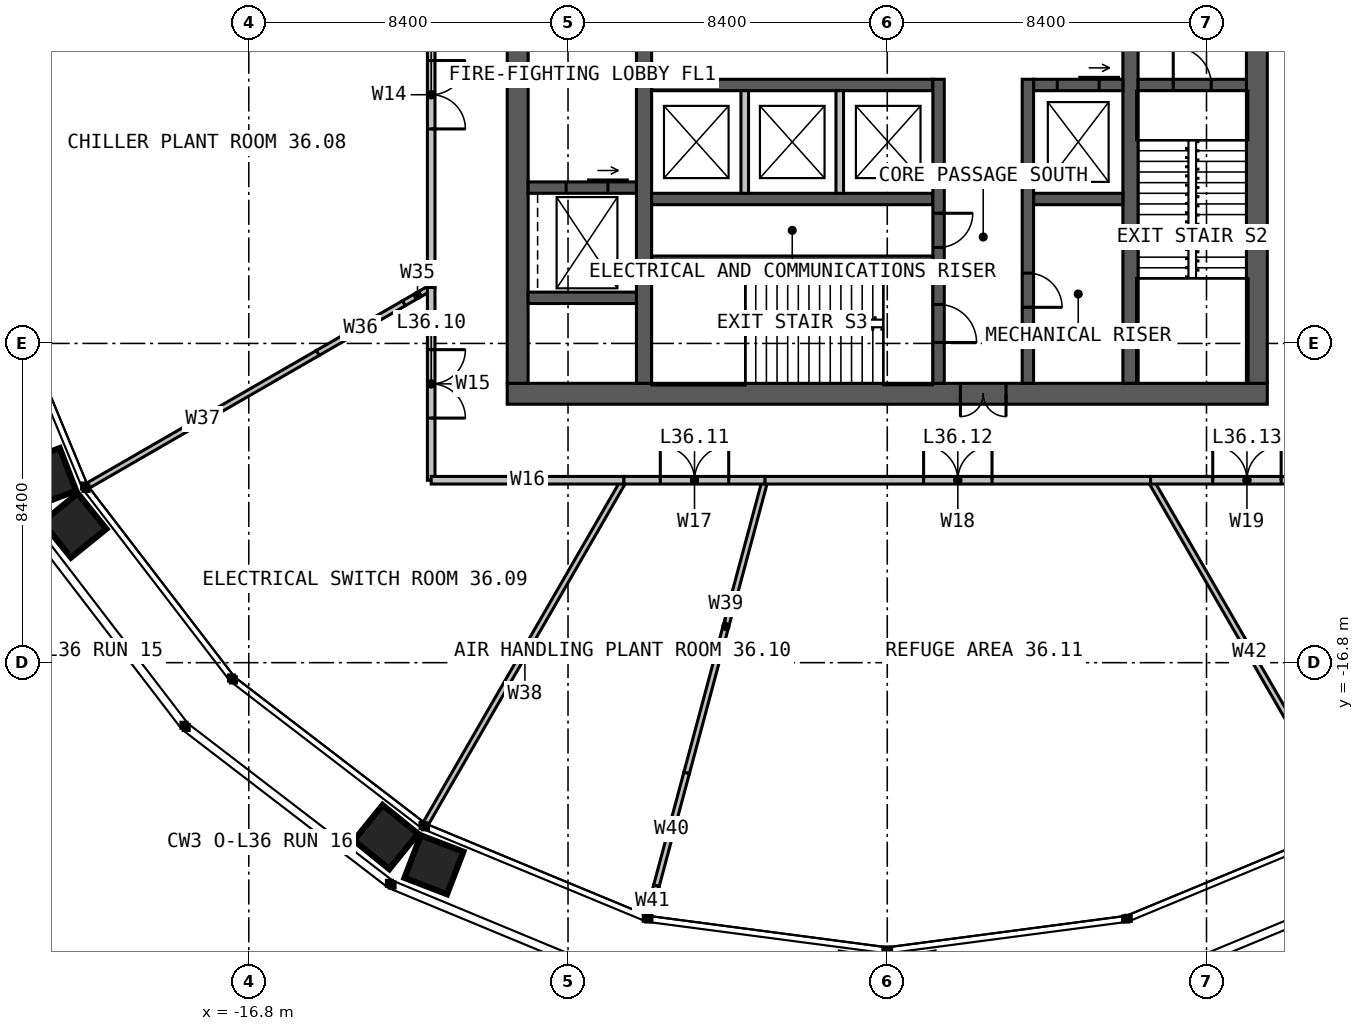
"""IFC4 building model, lengths in metres.
Left out: names, types, materials, properties, quantities, classifications, styles, units other than length and angle.
Written with IfcOpenShell. Run it as: python <this file> out.ifc"""

import sys

from ifc_helpers import new_model, si_unit, direction, frame, frame_2d, origin, place, context, subcontext, project, spatial, rectangle, extrude, element, fill, save


model = new_model("IFC4")
c1 = context("Model", 3, precision=1e-05, world=origin(), true_north=direction((0.0, 1.0)))
c2 = subcontext(c1, "Body", "Model", "MODEL_VIEW")
j1 = project(units=[si_unit("LENGTHUNIT", "METRE"), si_unit("PLANEANGLEUNIT", "RADIAN")], contexts=[c1])
p1 = place(None, origin())
s1 = spatial("IfcSite", under=j1, at=p1, CompositionType="ELEMENT")
p2 = place(p1, origin())
s2 = spatial("IfcBuilding", under=s1, at=p2, CompositionType="ELEMENT")
p3 = place(p2, frame((0.0, 0.0, 150.0)))
s3 = spatial("IfcBuildingStorey", under=s2, at=p3, CompositionType="ELEMENT", Elevation=150.0)
p4 = place(p3, frame((10.0, -9.725, 0.0), z_axis=(0.0, 0.0, 1.0), x_axis=(-1.0, 0.0, 0.0)))
e1 = element("IfcWall", 1, at=p4, inside=s3, PredefinedType="SOLIDWALL", context=c2, shape_type="SweptSolid", body=[
    extrude(rectangle(XDim=20.0, YDim=0.55, at=frame_2d((10.0, 0.0))), origin(), (0.0, 0.0, 1.0), 5.0),
])
p5 = place(p4, frame((6.875, 0.0, 0.0)))
e2 = element("IfcOpeningElement", 2, at=p5, cuts=e1, PredefinedType="OPENING", context=c2, shape_type="SweptSolid", body=[
    extrude(rectangle(XDim=1.2, YDim=2.2, at=frame_2d((0.6, 1.1))), frame((0.0, 0.285, 0.0), z_axis=(0.0, -1.0, 0.0), x_axis=(1.0, 0.0, 0.0)), (0.0, 0.0, 1.0), 0.57),
])
for number, where, z_axis, x_axis in (
    (3, (9.725, -9.45, 0.0), (0.0, 0.0, 1.0), (0.0, 1.0, 0.0)),
    (4, (-9.725, 9.45, 0.0), (0.0, 0.0, 1.0), (0.0, -1.0, 0.0)),
):
    element("IfcWall", number, at=place(p3, frame(where, z_axis=z_axis, x_axis=x_axis)), inside=s3, PredefinedType="SOLIDWALL", context=c2, shape_type="SweptSolid", body=[
        extrude(rectangle(XDim=18.9, YDim=0.55, at=frame_2d((9.45, 0.0))), origin(), (0.0, 0.0, 1.0), 5.0),
    ])
p6 = place(p3, frame((-6.4, -9.45, 0.0), z_axis=(0.0, 0.0, 1.0), x_axis=(0.0, 1.0, 0.0)))
e5 = element("IfcWall", 5, at=p6, inside=s3, PredefinedType="SOLIDWALL", context=c2, shape_type="SweptSolid", body=[
    extrude(rectangle(XDim=18.9, YDim=0.4, at=frame_2d((9.45, 0.0))), origin(), (0.0, 0.0, 1.0), 5.0),
])
p7 = place(p6, frame((8.95, 0.0, 0.0)))
e6 = element("IfcOpeningElement", 6, at=p7, cuts=e5, PredefinedType="OPENING", context=c2, shape_type="SweptSolid", body=[
    extrude(rectangle(XDim=1.0, YDim=2.2, at=frame_2d((0.5, 1.1))), frame((0.0, 0.21, 0.0), z_axis=(0.0, -1.0, 0.0), x_axis=(1.0, 0.0, 0.0)), (0.0, 0.0, 1.0), 0.42),
])
p8 = place(p3, frame((6.4, 9.45, 0.0), z_axis=(0.0, 0.0, 1.0), x_axis=(0.0, -1.0, 0.0)))
e7 = element("IfcWall", 7, at=p8, inside=s3, PredefinedType="SOLIDWALL", context=c2, shape_type="SweptSolid", body=[
    extrude(rectangle(XDim=18.9, YDim=0.4, at=frame_2d((9.45, 0.0))), origin(), (0.0, 0.0, 1.0), 5.0),
])
p9 = place(p8, frame((8.95, 0.0, 0.0)))
e8 = element("IfcOpeningElement", 8, at=p9, cuts=e7, PredefinedType="OPENING", context=c2, shape_type="SweptSolid", body=[
    extrude(rectangle(XDim=1.0, YDim=2.2, at=frame_2d((0.5, 1.1))), frame((0.0, 0.21, 0.0), z_axis=(0.0, -1.0, 0.0), x_axis=(1.0, 0.0, 0.0)), (0.0, 0.0, 1.0), 0.42),
])
p10 = place(p3, frame((-6.2, -1.6, 0.0), z_axis=(0.0, 0.0, 1.0), x_axis=(1.0, 0.0, 0.0)))
e9 = element("IfcWall", 9, at=p10, inside=s3, PredefinedType="SOLIDWALL", context=c2, shape_type="SweptSolid", body=[
    extrude(rectangle(XDim=7.4, YDim=0.3, at=frame_2d((3.7, 0.0))), origin(), (0.0, 0.0, 1.0), 5.0),
])
p11 = place(p3, frame((3.85, -1.6, 0.0), z_axis=(0.0, 0.0, 1.0), x_axis=(1.0, 0.0, 0.0)))
e10 = element("IfcWall", 10, at=p11, inside=s3, PredefinedType="SOLIDWALL", context=c2, shape_type="SweptSolid", body=[
    extrude(rectangle(XDim=2.35, YDim=0.3, at=frame_2d((1.175, 0.0))), origin(), (0.0, 0.0, 1.0), 5.0),
])
p12 = place(p11, frame((0.625, 0.0, 0.0)))
e11 = element("IfcOpeningElement", 11, at=p12, cuts=e10, PredefinedType="OPENING", context=c2, shape_type="SweptSolid", body=[
    extrude(rectangle(XDim=1.1, YDim=2.2, at=frame_2d((0.55, 1.1))), frame((0.0, 0.16, 0.0), z_axis=(0.0, -1.0, 0.0), x_axis=(1.0, 0.0, 0.0)), (0.0, 0.0, 1.0), 0.32),
])
p13 = place(p3, frame((-6.2, -4.6, 0.0), z_axis=(0.0, 0.0, 1.0), x_axis=(1.0, 0.0, 0.0)))
e12 = element("IfcWall", 12, at=p13, inside=s3, PredefinedType="SOLIDWALL", context=c2, shape_type="SweptSolid", body=[
    extrude(rectangle(XDim=7.4, YDim=0.3, at=frame_2d((3.7, 0.0))), origin(), (0.0, 0.0, 1.0), 5.0),
])
p14 = place(p3, frame((3.85, -4.6, 0.0), z_axis=(0.0, 0.0, 1.0), x_axis=(1.0, 0.0, 0.0)))
e13 = element("IfcWall", 13, at=p14, inside=s3, PredefinedType="SOLIDWALL", context=c2, shape_type="SweptSolid", body=[
    extrude(rectangle(XDim=2.35, YDim=0.3, at=frame_2d((1.175, 0.0))), origin(), (0.0, 0.0, 1.0), 5.0),
])
p15 = place(p3, frame((1.35, -1.45, 0.0), z_axis=(0.0, 0.0, 1.0), x_axis=(0.0, -1.0, 0.0)))
e14 = element("IfcWall", 14, at=p15, inside=s3, PredefinedType="SOLIDWALL", context=c2, shape_type="SweptSolid", body=[
    extrude(rectangle(XDim=8.0, YDim=0.3, at=frame_2d((4.0, 0.0))), origin(), (0.0, 0.0, 1.0), 5.0),
])
p16 = place(p15, frame((5.925, 0.0, 0.0)))
e15 = element("IfcOpeningElement", 15, at=p16, cuts=e14, PredefinedType="OPENING", context=c2, shape_type="SweptSolid", body=[
    extrude(rectangle(XDim=1.0, YDim=2.2, at=frame_2d((0.5, 1.1))), frame((0.0, 0.16, 0.0), z_axis=(0.0, -1.0, 0.0), x_axis=(1.0, 0.0, 0.0)), (0.0, 0.0, 1.0), 0.32),
])
p17 = place(p15, frame((3.525, 0.0, 0.0)))
e16 = element("IfcOpeningElement", 16, at=p17, cuts=e14, PredefinedType="OPENING", context=c2, shape_type="SweptSolid", body=[
    extrude(rectangle(XDim=0.9, YDim=2.2, at=frame_2d((0.45, 1.1))), frame((0.0, 0.16, 0.0), z_axis=(0.0, -1.0, 0.0), x_axis=(1.0, 0.0, 0.0)), (0.0, 0.0, 1.0), 0.32),
])
p18 = place(p3, frame((3.7, -1.45, 0.0), z_axis=(0.0, 0.0, 1.0), x_axis=(0.0, -1.0, 0.0)))
e17 = element("IfcWall", 17, at=p18, inside=s3, PredefinedType="SOLIDWALL", context=c2, shape_type="SweptSolid", body=[
    extrude(rectangle(XDim=8.0, YDim=0.3, at=frame_2d((4.0, 0.0))), origin(), (0.0, 0.0, 1.0), 5.0),
])
p19 = place(p18, frame((5.1, 0.0, 0.0)))
e18 = element("IfcOpeningElement", 18, at=p19, cuts=e17, PredefinedType="OPENING", context=c2, shape_type="SweptSolid", body=[
    extrude(rectangle(XDim=0.9, YDim=2.2, at=frame_2d((0.45, 1.1))), frame((0.0, 0.16, 0.0), z_axis=(0.0, -1.0, 0.0), x_axis=(1.0, 0.0, 0.0)), (0.0, 0.0, 1.0), 0.32),
])
p20 = place(p3, frame((-6.2, -6.2, 0.0), z_axis=(0.0, 0.0, 1.0), x_axis=(1.0, 0.0, 0.0)))
e19 = element("IfcWall", 19, at=p20, inside=s3, PredefinedType="SOLIDWALL", context=c2, shape_type="SweptSolid", body=[
    extrude(rectangle(XDim=7.4, YDim=0.2, at=frame_2d((3.7, 0.0))), origin(), (0.0, 0.0, 1.0), 5.0),
])
p21 = place(p3, frame((6.6, -1.6, 0.0), z_axis=(0.0, 0.0, 1.0), x_axis=(1.0, 0.0, 0.0)))
e20 = element("IfcWall", 20, at=p21, inside=s3, PredefinedType="SOLIDWALL", context=c2, shape_type="SweptSolid", body=[
    extrude(rectangle(XDim=2.85, YDim=0.3, at=frame_2d((1.425, 0.0))), origin(), (0.0, 0.0, 1.0), 5.0),
])
p22 = place(p21, frame((0.925, 0.0, 0.0)))
e21 = element("IfcOpeningElement", 21, at=p22, cuts=e20, PredefinedType="OPENING", context=c2, shape_type="SweptSolid", body=[
    extrude(rectangle(XDim=1.0, YDim=2.2, at=frame_2d((0.5, 1.1))), frame((0.0, 0.16, 0.0), z_axis=(0.0, -1.0, 0.0), x_axis=(1.0, 0.0, 0.0)), (0.0, 0.0, 1.0), 0.32),
])
p23 = place(p3, frame((-9.45, -4.3, 0.0), z_axis=(0.0, 0.0, 1.0), x_axis=(1.0, 0.0, 0.0)))
e22 = element("IfcWall", 22, at=p23, inside=s3, PredefinedType="SOLIDWALL", context=c2, shape_type="SweptSolid", body=[
    extrude(rectangle(XDim=2.85, YDim=0.3, at=frame_2d((1.425, 0.0))), origin(), (0.0, 0.0, 1.0), 5.0),
])
p24 = place(p23, frame((1.0, 0.0, 0.0)))
e23 = element("IfcOpeningElement", 23, at=p24, cuts=e22, PredefinedType="OPENING", context=c2, shape_type="SweptSolid", body=[
    extrude(rectangle(XDim=1.1, YDim=2.2, at=frame_2d((0.55, 1.1))), frame((0.0, 0.16, 0.0), z_axis=(0.0, -1.0, 0.0), x_axis=(1.0, 0.0, 0.0)), (0.0, 0.0, 1.0), 0.32),
])
p25 = place(p3, frame((-9.45, -7.2, 0.0), z_axis=(0.0, 0.0, 1.0), x_axis=(1.0, 0.0, 0.0)))
e24 = element("IfcWall", 24, at=p25, inside=s3, PredefinedType="SOLIDWALL", context=c2, shape_type="SweptSolid", body=[
    extrude(rectangle(XDim=2.85, YDim=0.3, at=frame_2d((1.425, 0.0))), origin(), (0.0, 0.0, 1.0), 5.0),
])
for number, where, z_axis, x_axis in (
    (25, (-3.75, -1.75, 0.0), (0.0, 0.0, 1.0), (0.0, -1.0, 0.0)),
    (26, (-1.25, -1.75, 0.0), (0.0, 0.0, 1.0), (0.0, -1.0, 0.0)),
):
    element("IfcWall", number, at=place(p3, frame(where, z_axis=z_axis, x_axis=x_axis)), inside=s3, PredefinedType="SOLIDWALL", context=c2, shape_type="SweptSolid", body=[
        extrude(rectangle(XDim=2.7, YDim=0.2, at=frame_2d((1.35, 0.0))), origin(), (0.0, 0.0, 1.0), 4.75),
    ])
p26 = place(p3, frame((-12.0, -6.928, 0.0), z_axis=(0.0, 0.0, 1.0), x_axis=(-0.86608282171, -0.499900536046, 0.0)))
e27 = element("IfcWall", 27, at=p26, inside=s3, PredefinedType="PARTITIONING", context=c2, shape_type="SweptSolid", body=[
    extrude(rectangle(XDim=0.831, YDim=0.15, at=frame_2d((0.416, 0.0))), origin(), (0.0, 0.0, 1.0), 4.8),
])
p27 = place(p3, frame((-12.719, -7.344, 0.0), z_axis=(0.0, 0.0, 1.0), x_axis=(-0.866002361659, -0.500039908008, 0.0)))
e28 = element("IfcWall", 28, at=p27, inside=s3, PredefinedType="PARTITIONING", context=c2, shape_type="SweptSolid", body=[
    extrude(rectangle(XDim=2.618, YDim=0.15, at=frame_2d((1.309, 0.0))), origin(), (0.0, 0.0, 1.0), 3.79),
])
p28 = place(p3, frame((-14.987, -8.653, 0.0), z_axis=(0.0, 0.0, 1.0), x_axis=(-0.86602409414, -0.500002268364, 0.0)))
e29 = element("IfcWall", 29, at=p28, inside=s3, PredefinedType="PARTITIONING", context=c2, shape_type="SweptSolid", body=[
    extrude(rectangle(XDim=6.974, YDim=0.15, at=frame_2d((3.487, 0.0))), origin(), (0.0, 0.0, 1.0), 4.8),
])
p29 = place(p3, frame((-6.928, -12.0, 0.0), z_axis=(0.0, 0.0, 1.0), x_axis=(-0.500003616288, -0.866023315909, 0.0)))
e30 = element("IfcWall", 30, at=p29, inside=s3, PredefinedType="PARTITIONING", context=c2, shape_type="SweptSolid", body=[
    extrude(rectangle(XDim=10.423, YDim=0.15, at=frame_2d((5.211, 0.0))), origin(), (0.0, 0.0, 1.0), 4.8),
])
p30 = place(p3, frame((-3.215, -12.0, 0.0), z_axis=(0.0, 0.0, 1.0), x_axis=(-0.258826894995, -0.965923722882, 0.0)))
e31 = element("IfcWall", 31, at=p30, inside=s3, PredefinedType="PARTITIONING", context=c2, shape_type="SweptSolid", body=[
    extrude(rectangle(XDim=7.973, YDim=0.15, at=frame_2d((3.987, 0.0))), origin(), (0.0, 0.0, 1.0), 4.8),
])
p31 = place(p3, frame((-5.279, -19.702, 0.0), z_axis=(0.0, 0.0, 1.0), x_axis=(-0.258819472716, -0.96592571171, 0.0)))
e32 = element("IfcWall", 32, at=p31, inside=s3, PredefinedType="PARTITIONING", context=c2, shape_type="SweptSolid", body=[
    extrude(rectangle(XDim=3.073, YDim=0.15, at=frame_2d((1.537, 0.0))), origin(), (0.0, 0.0, 1.0), 3.79),
])
p32 = place(p3, frame((-6.074, -22.67, 0.0), z_axis=(0.0, 0.0, 1.0), x_axis=(-0.258826555959, -0.96592381373, 0.0)))
e33 = element("IfcWall", 33, at=p32, inside=s3, PredefinedType="PARTITIONING", context=c2, shape_type="SweptSolid", body=[
    extrude(rectangle(XDim=0.809, YDim=0.15, at=frame_2d((0.405, 0.0))), origin(), (0.0, 0.0, 1.0), 4.8),
])
p33 = place(p3, frame((6.928, -12.0, 0.0), z_axis=(0.0, 0.0, 1.0), x_axis=(0.500003616288, -0.866023315909, 0.0)))
e34 = element("IfcWall", 34, at=p33, inside=s3, PredefinedType="PARTITIONING", context=c2, shape_type="SweptSolid", body=[
    extrude(rectangle(XDim=10.423, YDim=0.15, at=frame_2d((5.211, 0.0))), origin(), (0.0, 0.0, 1.0), 4.8),
])
p34 = place(p3, frame((-12.0, 3.215, 0.0), z_axis=(0.0, 0.0, 1.0), x_axis=(0.0, -1.0, 0.0)))
e35 = element("IfcWall", 35, at=p34, inside=s3, PredefinedType="PARTITIONING", context=c2, shape_type="SweptSolid", body=[
    extrude(rectangle(XDim=10.144, YDim=0.2, at=frame_2d((5.072, 0.0))), origin(), (0.0, 0.0, 1.0), 4.8),
])
p35 = place(p34, frame((4.172, 0.0, 0.0)))
e36 = element("IfcOpeningElement", 36, at=p35, cuts=e35, PredefinedType="OPENING", context=c2, shape_type="SweptSolid", body=[
    extrude(rectangle(XDim=1.8, YDim=2.2, at=frame_2d((0.9, 1.1))), frame((0.0, 0.11, 0.0), z_axis=(0.0, -1.0, 0.0), x_axis=(1.0, 0.0, 0.0)), (0.0, 0.0, 1.0), 0.22),
])
p36 = place(p3, frame((-12.0, -6.928, 0.0), z_axis=(0.0, 0.0, 1.0), x_axis=(0.0, -1.0, 0.0)))
e37 = element("IfcWall", 37, at=p36, inside=s3, PredefinedType="PARTITIONING", context=c2, shape_type="SweptSolid", body=[
    extrude(rectangle(XDim=5.072, YDim=0.2, at=frame_2d((2.536, 0.0))), origin(), (0.0, 0.0, 1.0), 4.8),
])
p37 = place(p36, frame((1.636, 0.0, 0.0)))
e38 = element("IfcOpeningElement", 38, at=p37, cuts=e37, PredefinedType="OPENING", context=c2, shape_type="SweptSolid", body=[
    extrude(rectangle(XDim=1.8, YDim=2.2, at=frame_2d((0.9, 1.1))), frame((0.0, 0.11, 0.0), z_axis=(0.0, -1.0, 0.0), x_axis=(1.0, 0.0, 0.0)), (0.0, 0.0, 1.0), 0.22),
])
p38 = place(p3, frame((-12.0, -12.0, 0.0), z_axis=(0.0, 0.0, 1.0), x_axis=(1.0, 0.0, 0.0)))
e39 = element("IfcWall", 39, at=p38, inside=s3, PredefinedType="PARTITIONING", context=c2, shape_type="SweptSolid", body=[
    extrude(rectangle(XDim=5.072, YDim=0.2, at=frame_2d((2.536, 0.0))), origin(), (0.0, 0.0, 1.0), 4.8),
])
p39 = place(p3, frame((-6.928, -12.0, 0.0), z_axis=(0.0, 0.0, 1.0), x_axis=(1.0, 0.0, 0.0)))
e40 = element("IfcWall", 40, at=p39, inside=s3, PredefinedType="PARTITIONING", context=c2, shape_type="SweptSolid", body=[
    extrude(rectangle(XDim=3.713, YDim=0.2, at=frame_2d((1.856, 0.0))), origin(), (0.0, 0.0, 1.0), 4.8),
])
p40 = place(p39, frame((0.956, 0.0, 0.0)))
e41 = element("IfcOpeningElement", 41, at=p40, cuts=e40, PredefinedType="OPENING", context=c2, shape_type="SweptSolid", body=[
    extrude(rectangle(XDim=1.8, YDim=2.2, at=frame_2d((0.9, 1.1))), frame((0.0, 0.11, 0.0), z_axis=(0.0, -1.0, 0.0), x_axis=(1.0, 0.0, 0.0)), (0.0, 0.0, 1.0), 0.22),
])
p41 = place(p3, frame((-3.215, -12.0, 0.0), z_axis=(0.0, 0.0, 1.0), x_axis=(1.0, 0.0, 0.0)))
e42 = element("IfcWall", 42, at=p41, inside=s3, PredefinedType="PARTITIONING", context=c2, shape_type="SweptSolid", body=[
    extrude(rectangle(XDim=10.144, YDim=0.2, at=frame_2d((5.072, 0.0))), origin(), (0.0, 0.0, 1.0), 4.8),
])
p42 = place(p41, frame((4.172, 0.0, 0.0)))
e43 = element("IfcOpeningElement", 43, at=p42, cuts=e42, PredefinedType="OPENING", context=c2, shape_type="SweptSolid", body=[
    extrude(rectangle(XDim=1.8, YDim=2.2, at=frame_2d((0.9, 1.1))), frame((0.0, 0.11, 0.0), z_axis=(0.0, -1.0, 0.0), x_axis=(1.0, 0.0, 0.0)), (0.0, 0.0, 1.0), 0.22),
])
p43 = place(p3, frame((6.928, -12.0, 0.0), z_axis=(0.0, 0.0, 1.0), x_axis=(1.0, 0.0, 0.0)))
e44 = element("IfcWall", 44, at=p43, inside=s3, PredefinedType="PARTITIONING", context=c2, shape_type="SweptSolid", body=[
    extrude(rectangle(XDim=5.072, YDim=0.2, at=frame_2d((2.536, 0.0))), origin(), (0.0, 0.0, 1.0), 4.8),
])
p44 = place(p43, frame((1.636, 0.0, 0.0)))
e45 = element("IfcOpeningElement", 45, at=p44, cuts=e44, PredefinedType="OPENING", context=c2, shape_type="SweptSolid", body=[
    extrude(rectangle(XDim=1.8, YDim=2.2, at=frame_2d((0.9, 1.1))), frame((0.0, 0.11, 0.0), z_axis=(0.0, -1.0, 0.0), x_axis=(1.0, 0.0, 0.0)), (0.0, 0.0, 1.0), 0.22),
])
p45 = place(p5, origin())
e46 = element("IfcDoor", 46, at=p45, inside=s3, OperationType="DOUBLE_DOOR_SINGLE_SWING", PredefinedType="DOOR", context=c2, shape_type="SweptSolid", body=[
    extrude(rectangle(XDim=1.2, YDim=2.2, at=frame_2d((0.6, 1.1))), frame((0.0, 0.025, 0.0), z_axis=(0.0, -1.0, 0.0), x_axis=(1.0, 0.0, 0.0)), (0.0, 0.0, 1.0), 0.05),
])
fill(e2, e46)
p46 = place(p22, origin())
e47 = element("IfcDoor", 47, at=p46, inside=s3, OperationType="SINGLE_SWING_LEFT", PredefinedType="DOOR", context=c2, shape_type="SweptSolid", body=[
    extrude(rectangle(XDim=1.0, YDim=2.2, at=frame_2d((0.5, 1.1))), frame((0.0, 0.025, 0.0), z_axis=(0.0, -1.0, 0.0), x_axis=(1.0, 0.0, 0.0)), (0.0, 0.0, 1.0), 0.05),
])
fill(e21, e47)
p47 = place(p16, origin())
e48 = element("IfcDoor", 48, at=p47, inside=s3, OperationType="SINGLE_SWING_RIGHT", PredefinedType="DOOR", context=c2, shape_type="SweptSolid", body=[
    extrude(rectangle(XDim=1.0, YDim=2.2, at=frame_2d((0.5, 1.1))), frame((0.0, 0.025, 0.0), z_axis=(0.0, -1.0, 0.0), x_axis=(1.0, 0.0, 0.0)), (0.0, 0.0, 1.0), 0.05),
])
fill(e15, e48)
p48 = place(p17, origin())
e49 = element("IfcDoor", 49, at=p48, inside=s3, OperationType="SINGLE_SWING_LEFT", PredefinedType="DOOR", context=c2, shape_type="SweptSolid", body=[
    extrude(rectangle(XDim=0.9, YDim=2.2, at=frame_2d((0.45, 1.1))), frame((0.0, 0.025, 0.0), z_axis=(0.0, -1.0, 0.0), x_axis=(1.0, 0.0, 0.0)), (0.0, 0.0, 1.0), 0.05),
])
fill(e16, e49)
p49 = place(p19, origin())
e50 = element("IfcDoor", 50, at=p49, inside=s3, OperationType="SINGLE_SWING_RIGHT", PredefinedType="DOOR", context=c2, shape_type="SweptSolid", body=[
    extrude(rectangle(XDim=0.9, YDim=2.2, at=frame_2d((0.45, 1.1))), frame((0.0, 0.025, 0.0), z_axis=(0.0, -1.0, 0.0), x_axis=(1.0, 0.0, 0.0)), (0.0, 0.0, 1.0), 0.05),
])
fill(e18, e50)
p50 = place(p12, origin())
e51 = element("IfcDoor", 51, at=p50, inside=s3, OperationType="SLIDING_TO_LEFT", PredefinedType="DOOR", context=c2, shape_type="SweptSolid", body=[
    extrude(rectangle(XDim=1.1, YDim=2.2, at=frame_2d((0.55, 1.1))), frame((0.0, 0.025, 0.0), z_axis=(0.0, -1.0, 0.0), x_axis=(1.0, 0.0, 0.0)), (0.0, 0.0, 1.0), 0.05),
])
fill(e11, e51)
p51 = place(p24, origin())
e52 = element("IfcDoor", 52, at=p51, inside=s3, OperationType="SLIDING_TO_LEFT", PredefinedType="DOOR", context=c2, shape_type="SweptSolid", body=[
    extrude(rectangle(XDim=1.1, YDim=2.2, at=frame_2d((0.55, 1.1))), frame((0.0, 0.025, 0.0), z_axis=(0.0, -1.0, 0.0), x_axis=(1.0, 0.0, 0.0)), (0.0, 0.0, 1.0), 0.05),
])
fill(e23, e52)
p52 = place(p35, origin())
e53 = element("IfcDoor", 53, at=p52, inside=s3, OperationType="DOUBLE_DOOR_SINGLE_SWING", PredefinedType="DOOR", context=c2, shape_type="SweptSolid", body=[
    extrude(rectangle(XDim=1.8, YDim=2.2, at=frame_2d((0.9, 1.1))), frame((0.0, 0.025, 0.0), z_axis=(0.0, -1.0, 0.0), x_axis=(1.0, 0.0, 0.0)), (0.0, 0.0, 1.0), 0.05),
])
fill(e36, e53)
p53 = place(p37, origin())
e54 = element("IfcDoor", 54, at=p53, inside=s3, OperationType="DOUBLE_DOOR_SINGLE_SWING", PredefinedType="DOOR", context=c2, shape_type="SweptSolid", body=[
    extrude(rectangle(XDim=1.8, YDim=2.2, at=frame_2d((0.9, 1.1))), frame((0.0, 0.025, 0.0), z_axis=(0.0, -1.0, 0.0), x_axis=(1.0, 0.0, 0.0)), (0.0, 0.0, 1.0), 0.05),
])
fill(e38, e54)
p54 = place(p40, origin())
e55 = element("IfcDoor", 55, at=p54, inside=s3, OperationType="DOUBLE_DOOR_SINGLE_SWING", PredefinedType="DOOR", context=c2, shape_type="SweptSolid", body=[
    extrude(rectangle(XDim=1.8, YDim=2.2, at=frame_2d((0.9, 1.1))), frame((0.0, 0.025, 0.0), z_axis=(0.0, -1.0, 0.0), x_axis=(1.0, 0.0, 0.0)), (0.0, 0.0, 1.0), 0.05),
])
fill(e41, e55)
p55 = place(p42, origin())
e56 = element("IfcDoor", 56, at=p55, inside=s3, OperationType="DOUBLE_DOOR_SINGLE_SWING", PredefinedType="DOOR", context=c2, shape_type="SweptSolid", body=[
    extrude(rectangle(XDim=1.8, YDim=2.2, at=frame_2d((0.9, 1.1))), frame((0.0, 0.025, 0.0), z_axis=(0.0, -1.0, 0.0), x_axis=(1.0, 0.0, 0.0)), (0.0, 0.0, 1.0), 0.05),
])
fill(e43, e56)
p56 = place(p44, origin())
e57 = element("IfcDoor", 57, at=p56, inside=s3, OperationType="DOUBLE_DOOR_SINGLE_SWING", PredefinedType="DOOR", context=c2, shape_type="SweptSolid", body=[
    extrude(rectangle(XDim=1.8, YDim=2.2, at=frame_2d((0.9, 1.1))), frame((0.0, 0.025, 0.0), z_axis=(0.0, -1.0, 0.0), x_axis=(1.0, 0.0, 0.0)), (0.0, 0.0, 1.0), 0.05),
])
fill(e45, e57)
save(model, sys.argv[1])
